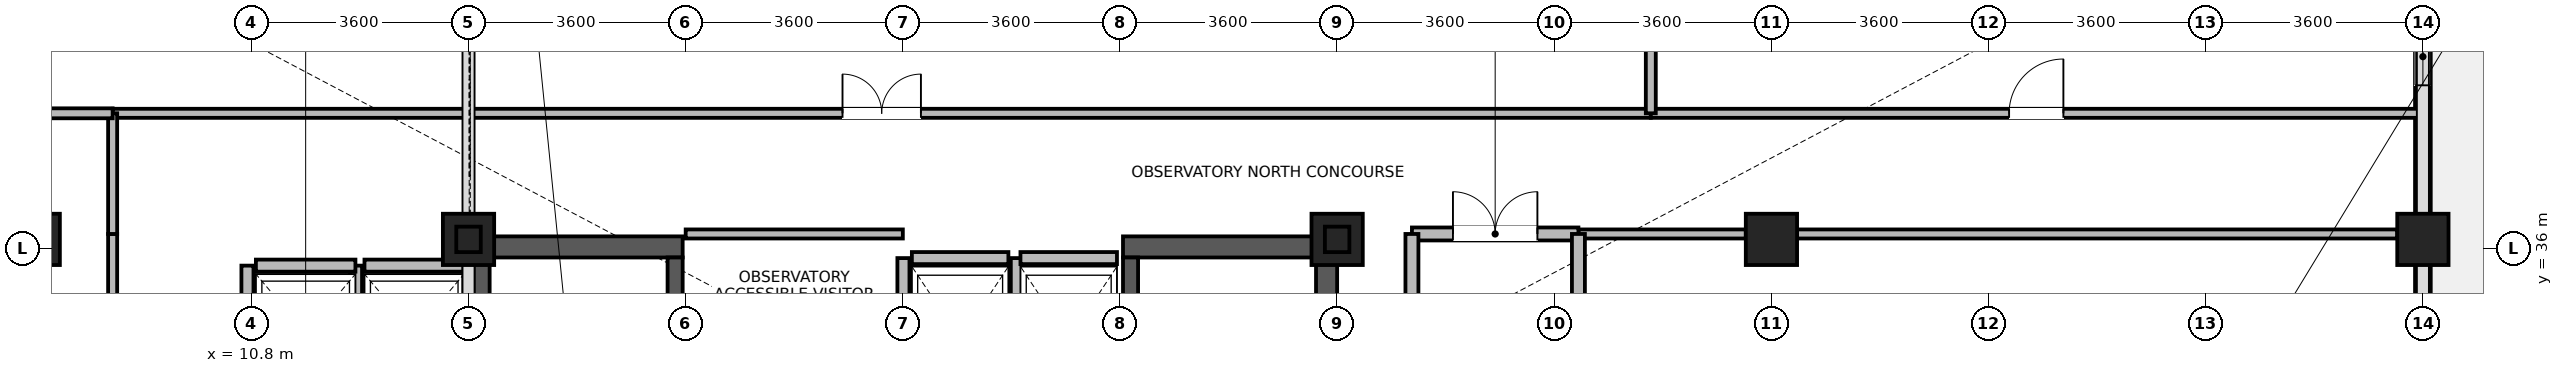
"""IFC4 building model, lengths in metres.
Left out: names, types, materials, properties, quantities, classifications, styles, units other than length and angle.
Written with IfcOpenShell. Run it as: python <this file> out.ifc"""

import sys

from ifc_helpers import new_model, si_unit, direction, frame, frame_2d, origin, origin_2d, place, context, subcontext, project, spatial, rectangle, i_section, extrude, source, transform, mapped, element, fill, save


model = new_model("IFC4")
c1 = context("Model", 3, precision=1e-05, world=origin(), true_north=direction((0.0, 1.0)))
c2 = subcontext(c1, "Body", "Model", "MODEL_VIEW")
j1 = project(units=[si_unit("LENGTHUNIT", "METRE"), si_unit("PLANEANGLEUNIT", "RADIAN")], contexts=[c1])
p1 = place(None, origin())
s1 = spatial("IfcSite", under=j1, at=p1, CompositionType="ELEMENT")
p2 = place(p1, origin())
s2 = spatial("IfcBuilding", under=s1, at=p2, CompositionType="ELEMENT")
p3 = place(p2, frame((0.0, 0.0, 298.0)))
s3 = spatial("IfcBuildingStorey", under=s2, at=p3, CompositionType="ELEMENT", Elevation=298.0)
for number, where, z_axis, x_axis in (
    (1, (14.575, 28.5, 0.0), (0.0, 0.0, 1.0), (0.0, 1.0, 0.0)),
    (2, (28.625, 28.5, 0.0), (0.0, 0.0, 1.0), (0.0, 1.0, 0.0)),
):
    element("IfcWall", number, at=place(p3, frame(where, z_axis=z_axis, x_axis=x_axis)), inside=s3, PredefinedType="SHEAR", context=c2, shape_type="SweptSolid", body=[
        extrude(rectangle(XDim=7.7, YDim=0.35, at=frame_2d((3.85, 0.0))), origin(), (0.0, 0.0, 1.0), 6.0),
    ])
for number, where, z_axis, x_axis in (
    (3, (14.75, 36.025, 0.0), (0.0, 0.0, 1.0), (1.0, 0.0, 0.0)),
    (4, (25.25, 36.025, 0.0), (0.0, 0.0, 1.0), (1.0, 0.0, 0.0)),
):
    element("IfcWall", number, at=place(p3, frame(where, z_axis=z_axis, x_axis=x_axis)), inside=s3, PredefinedType="SHEAR", context=c2, shape_type="SweptSolid", body=[
        extrude(rectangle(XDim=3.2, YDim=0.35, at=frame_2d((1.6, 0.0))), origin(), (0.0, 0.0, 1.0), 6.0),
    ])
p4 = place(p3, frame((17.825, 28.85, 0.0), z_axis=(0.0, 0.0, 1.0), x_axis=(0.0, 1.0, 0.0)))
e5 = element("IfcWall", 5, at=p4, inside=s3, PredefinedType="SHEAR", context=c2, shape_type="SweptSolid", body=[
    extrude(rectangle(XDim=7.0, YDim=0.25, at=frame_2d((3.5, 0.0))), origin(), (0.0, 0.0, 1.0), 6.0),
])
p5 = place(p4, frame((0.15, 0.0, 0.0)))
e6 = element("IfcOpeningElement", 6, at=p5, cuts=e5, PredefinedType="OPENING", context=c2, shape_type="SweptSolid", body=[
    extrude(rectangle(XDim=1.1, YDim=2.08, at=frame_2d((0.55, 1.04))), frame((0.0, 0.135, 0.0), z_axis=(0.0, -1.0, 0.0), x_axis=(1.0, 0.0, 0.0)), (0.0, 0.0, 1.0), 0.27),
])
p6 = place(p3, frame((25.375, 28.85, 0.0), z_axis=(0.0, 0.0, 1.0), x_axis=(0.0, 1.0, 0.0)))
e7 = element("IfcWall", 7, at=p6, inside=s3, PredefinedType="SHEAR", context=c2, shape_type="SweptSolid", body=[
    extrude(rectangle(XDim=7.0, YDim=0.25, at=frame_2d((3.5, 0.0))), origin(), (0.0, 0.0, 1.0), 6.0),
])
p7 = place(p6, frame((0.15, 0.0, 0.0)))
e8 = element("IfcOpeningElement", 8, at=p7, cuts=e7, PredefinedType="OPENING", context=c2, shape_type="SweptSolid", body=[
    extrude(rectangle(XDim=1.1, YDim=2.08, at=frame_2d((0.55, 1.04))), frame((0.0, 0.135, 0.0), z_axis=(0.0, -1.0, 0.0), x_axis=(1.0, 0.0, 0.0)), (0.0, 0.0, 1.0), 0.27),
])
m1 = source(origin(), c2, "Body", "SweptSolid", [
    extrude(rectangle(XDim=0.85, YDim=0.85, at=origin_2d()), origin(), (0.0, 0.0, 1.0), 6.0),
])
for number, where, z_axis, x_axis in (
    (9, (7.2, 36.15, 0.0), (0.0, 0.0, 1.0), (1.0, 0.0, 0.0)),
    (10, (14.4, 36.15, 0.0), (0.0, 0.0, 1.0), (1.0, 0.0, 0.0)),
    (11, (28.8, 36.15, 0.0), (0.0, 0.0, 1.0), (1.0, 0.0, 0.0)),
    (12, (36.0, 36.15, 0.0), (0.0, 0.0, 1.0), (1.0, 0.0, 0.0)),
    (13, (46.8, 36.15, 0.0), (0.0, 0.0, 1.0), (1.0, 0.0, 0.0)),
):
    element("IfcColumn", number, at=place(p3, frame(where, z_axis=z_axis, x_axis=x_axis)), inside=s3, PredefinedType="COLUMN", context=c2, shape_type="MappedRepresentation", body=[
        mapped(m1, transform((0.0, 0.0, 0.0), x_axis=(1.0, 0.0, 0.0), y_axis=(0.0, 1.0, 0.0), z_axis=(0.0, 0.0, 1.0), scale=1.0)),
    ])
m2 = source(origin(), c2, "Body", "SweptSolid", [
    extrude(i_section(OverallWidth=0.406, OverallDepth=0.422, WebThickness=0.023, FlangeThickness=0.031, FilletRadius=0.015, at=origin_2d()), origin(), (0.0, 0.0, 1.0), 29.81),
])
p8 = place(p3, frame((28.8, 36.15, 6.0), z_axis=(0.0, 0.0, 1.0), x_axis=(1.0, 0.0, 0.0)))
e14 = element("IfcColumn", 14, at=p8, inside=s3, PredefinedType="COLUMN", context=c2, shape_type="MappedRepresentation", body=[
    mapped(m2, transform((0.0, 0.0, 0.0), x_axis=(1.0, 0.0, 0.0), y_axis=(0.0, 1.0, 0.0), z_axis=(0.0, 0.0, 1.0), scale=1.0)),
])
m3 = source(origin(), c2, "Body", "SweptSolid", [
    extrude(i_section(OverallWidth=0.406, OverallDepth=0.422, WebThickness=0.023, FlangeThickness=0.031, FilletRadius=0.015, at=origin_2d()), origin(), (0.0, 0.0, 1.0), 28.41),
])
p9 = place(p3, frame((14.4, 36.15, 6.0), z_axis=(0.0, 0.0, 1.0), x_axis=(1.0, 0.0, 0.0)))
e15 = element("IfcColumn", 15, at=p9, inside=s3, PredefinedType="COLUMN", context=c2, shape_type="MappedRepresentation", body=[
    mapped(m3, transform((0.0, 0.0, 0.0), x_axis=(1.0, 0.0, 0.0), y_axis=(0.0, 1.0, 0.0), z_axis=(0.0, 0.0, 1.0), scale=1.0)),
])
p10 = place(p3, frame((46.8, 35.724, 0.0), z_axis=(0.0, 0.0, 1.0), x_axis=(0.0, -1.0, 0.0)))
e16 = element("IfcWall", 16, at=p10, inside=s3, PredefinedType="STANDARD", context=c2, shape_type="SweptSolid", body=[
    extrude(rectangle(XDim=6.648, YDim=0.26, at=frame_2d((3.324, 0.0))), origin(), (0.0, 0.0, 1.0), 5.58),
])
p11 = place(p10, frame((0.762, 0.0, 0.85)))
e17 = element("IfcOpeningElement", 17, at=p11, cuts=e16, PredefinedType="OPENING", context=c2, shape_type="SweptSolid", body=[
    extrude(rectangle(XDim=1.8, YDim=1.85, at=frame_2d((0.9, 0.925))), frame((0.0, 0.14, 0.0), z_axis=(0.0, -1.0, 0.0), x_axis=(1.0, 0.0, 0.0)), (0.0, 0.0, 1.0), 0.28),
])
p12 = place(p10, frame((4.086, 0.0, 0.85)))
e18 = element("IfcOpeningElement", 18, at=p12, cuts=e16, PredefinedType="OPENING", context=c2, shape_type="SweptSolid", body=[
    extrude(rectangle(XDim=1.8, YDim=1.85, at=frame_2d((0.9, 0.925))), frame((0.0, 0.14, 0.0), z_axis=(0.0, -1.0, 0.0), x_axis=(1.0, 0.0, 0.0)), (0.0, 0.0, 1.0), 0.28),
])
p13 = place(p3, frame((46.8, 42.774, 0.0), z_axis=(0.0, 0.0, 1.0), x_axis=(0.0, -1.0, 0.0)))
e19 = element("IfcWall", 19, at=p13, inside=s3, PredefinedType="STANDARD", context=c2, shape_type="SweptSolid", body=[
    extrude(rectangle(XDim=6.198, YDim=0.26, at=frame_2d((3.099, 0.0))), origin(), (0.0, 0.0, 1.0), 5.58),
])
p14 = place(p13, frame((0.649, 0.0, 0.85)))
e20 = element("IfcOpeningElement", 20, at=p14, cuts=e19, PredefinedType="OPENING", context=c2, shape_type="SweptSolid", body=[
    extrude(rectangle(XDim=1.8, YDim=1.85, at=frame_2d((0.9, 0.925))), frame((0.0, 0.14, 0.0), z_axis=(0.0, -1.0, 0.0), x_axis=(1.0, 0.0, 0.0)), (0.0, 0.0, 1.0), 0.28),
])
p15 = place(p13, frame((3.12, 0.0, 0.85)))
e21 = element("IfcOpeningElement", 21, at=p15, cuts=e19, PredefinedType="OPENING", context=c2, shape_type="SweptSolid", body=[
    extrude(rectangle(XDim=0.95, YDim=1.75, at=frame_2d((0.475, 0.875))), frame((0.0, 0.14, 0.0), z_axis=(0.0, -1.0, 0.0), x_axis=(1.0, 0.0, 0.0)), (0.0, 0.0, 1.0), 0.28),
])
p16 = place(p3, frame((12.675, 35.715, 0.0), z_axis=(0.0, 0.0, 1.0), x_axis=(1.0, 0.0, 0.0)))
e22 = element("IfcWall", 22, at=p16, inside=s3, PredefinedType="PARTITIONING", context=c2, shape_type="SweptSolid", body=[
    extrude(rectangle(XDim=1.65, YDim=0.2, at=frame_2d((0.825, 0.0))), origin(), (0.0, 0.0, 1.0), 5.9),
])
p17 = place(p3, frame((12.535, 33.485, 0.0), z_axis=(0.0, 0.0, 1.0), x_axis=(0.0, 1.0, 0.0)))
e23 = element("IfcWall", 23, at=p17, inside=s3, PredefinedType="PARTITIONING", context=c2, shape_type="SweptSolid", body=[
    extrude(rectangle(XDim=2.23, YDim=0.2, at=frame_2d((1.115, 0.0))), origin(), (0.0, 0.0, 1.0), 5.9),
])
p18 = place(p3, frame((10.875, 35.715, 0.0), z_axis=(0.0, 0.0, 1.0), x_axis=(1.0, 0.0, 0.0)))
e24 = element("IfcWall", 24, at=p18, inside=s3, PredefinedType="PARTITIONING", context=c2, shape_type="SweptSolid", body=[
    extrude(rectangle(XDim=1.65, YDim=0.2, at=frame_2d((0.825, 0.0))), origin(), (0.0, 0.0, 1.0), 5.9),
])
p19 = place(p3, frame((10.735, 33.485, 0.0), z_axis=(0.0, 0.0, 1.0), x_axis=(0.0, 1.0, 0.0)))
e25 = element("IfcWall", 25, at=p19, inside=s3, PredefinedType="PARTITIONING", context=c2, shape_type="SweptSolid", body=[
    extrude(rectangle(XDim=2.23, YDim=0.2, at=frame_2d((1.115, 0.0))), origin(), (0.0, 0.0, 1.0), 5.9),
])
p20 = place(p3, frame((21.75, 35.84, 0.0), z_axis=(0.0, 0.0, 1.0), x_axis=(1.0, 0.0, 0.0)))
e26 = element("IfcWall", 26, at=p20, inside=s3, PredefinedType="PARTITIONING", context=c2, shape_type="SweptSolid", body=[
    extrude(rectangle(XDim=1.6, YDim=0.2, at=frame_2d((0.8, 0.0))), origin(), (0.0, 0.0, 1.0), 5.08),
])
for number, where, z_axis, x_axis in (
    (27, (21.61, 33.16, 0.0), (0.0, 0.0, 1.0), (0.0, 1.0, 0.0)),
    (28, (23.49, 33.16, 0.0), (0.0, 0.0, 1.0), (0.0, 1.0, 0.0)),
):
    element("IfcWall", number, at=place(p3, frame(where, z_axis=z_axis, x_axis=x_axis)), inside=s3, PredefinedType="PARTITIONING", context=c2, shape_type="SweptSolid", body=[
        extrude(rectangle(XDim=2.68, YDim=0.2, at=frame_2d((1.34, 0.0))), origin(), (0.0, 0.0, 1.0), 5.9),
    ])
p21 = place(p3, frame((23.55, 35.84, 0.0), z_axis=(0.0, 0.0, 1.0), x_axis=(1.0, 0.0, 0.0)))
e29 = element("IfcWall", 29, at=p21, inside=s3, PredefinedType="PARTITIONING", context=c2, shape_type="SweptSolid", body=[
    extrude(rectangle(XDim=1.6, YDim=0.2, at=frame_2d((0.8, 0.0))), origin(), (0.0, 0.0, 1.0), 5.08),
])
p22 = place(p3, frame((8.5, 38.24, 0.0), z_axis=(0.0, 0.0, 1.0), x_axis=(1.0, 0.0, 0.0)))
e30 = element("IfcWall", 30, at=p22, inside=s3, PredefinedType="PARTITIONING", context=c2, shape_type="SweptSolid", body=[
    extrude(rectangle(XDim=25.5, YDim=0.15, at=frame_2d((12.75, 0.0))), origin(), (0.0, 0.0, 1.0), 5.9),
])
p23 = place(p22, frame((12.1, 0.0, 0.0)))
e31 = element("IfcOpeningElement", 31, at=p23, cuts=e30, PredefinedType="OPENING", context=c2, shape_type="SweptSolid", body=[
    extrude(rectangle(XDim=1.3, YDim=2.12, at=frame_2d((0.65, 1.06))), frame((0.0, 0.085, 0.0), z_axis=(0.0, -1.0, 0.0), x_axis=(1.0, 0.0, 0.0)), (0.0, 0.0, 1.0), 0.17),
])
p24 = place(p3, frame((32.8, 36.24, 0.0), z_axis=(0.0, 0.0, 1.0), x_axis=(1.0, 0.0, 0.0)))
e32 = element("IfcWall", 32, at=p24, inside=s3, PredefinedType="PARTITIONING", context=c2, shape_type="SweptSolid", body=[
    extrude(rectangle(XDim=2.775, YDim=0.15, at=frame_2d((1.387, 0.0))), origin(), (0.0, 0.0, 1.0), 5.43),
])
p25 = place(p3, frame((36.425, 36.24, 0.0), z_axis=(0.0, 0.0, 1.0), x_axis=(1.0, 0.0, 0.0)))
e33 = element("IfcWall", 33, at=p25, inside=s3, PredefinedType="PARTITIONING", context=c2, shape_type="SweptSolid", body=[
    extrude(rectangle(XDim=9.95, YDim=0.15, at=frame_2d((4.975, 0.0))), origin(), (0.0, 0.0, 1.0), 5.43),
])
p26 = place(p3, frame((34.0, 38.24, 0.0), z_axis=(0.0, 0.0, 1.0), x_axis=(1.0, 0.0, 0.0)))
e34 = element("IfcWall", 34, at=p26, inside=s3, PredefinedType="PARTITIONING", context=c2, shape_type="SweptSolid", body=[
    extrude(rectangle(XDim=12.78, YDim=0.15, at=frame_2d((6.39, 0.0))), origin(), (0.0, 0.0, 1.0), 5.9),
])
p27 = place(p26, frame((5.94, 0.0, 0.0)))
e35 = element("IfcOpeningElement", 35, at=p27, cuts=e34, PredefinedType="OPENING", context=c2, shape_type="SweptSolid", body=[
    extrude(rectangle(XDim=0.9, YDim=2.08, at=frame_2d((0.45, 1.04))), frame((0.0, 0.085, 0.0), z_axis=(0.0, -1.0, 0.0), x_axis=(1.0, 0.0, 0.0)), (0.0, 0.0, 1.0), 0.17),
])
p28 = place(p3, frame((8.5, 28.56, 0.0), z_axis=(0.0, 0.0, 1.0), x_axis=(0.0, 1.0, 0.0)))
e36 = element("IfcWall", 36, at=p28, inside=s3, PredefinedType="PARTITIONING", context=c2, shape_type="SweptSolid", body=[
    extrude(rectangle(XDim=7.68, YDim=0.15, at=frame_2d((3.84, 0.0))), origin(), (0.0, 0.0, 1.0), 5.9),
])
p29 = place(p28, frame((3.19, 0.0, 0.0)))
e37 = element("IfcOpeningElement", 37, at=p29, cuts=e36, PredefinedType="OPENING", context=c2, shape_type="SweptSolid", body=[
    extrude(rectangle(XDim=1.3, YDim=2.12, at=frame_2d((0.65, 1.06))), frame((0.0, 0.085, 0.0), z_axis=(0.0, -1.0, 0.0), x_axis=(1.0, 0.0, 0.0)), (0.0, 0.0, 1.0), 0.17),
])
p30 = place(p3, frame((18.0, 36.24, 0.0), z_axis=(0.0, 0.0, 1.0), x_axis=(1.0, 0.0, 0.0)))
e38 = element("IfcWall", 38, at=p30, inside=s3, PredefinedType="PARTITIONING", context=c2, shape_type="SweptSolid", body=[
    extrude(rectangle(XDim=3.6, YDim=0.15, at=frame_2d((1.8, 0.0))), origin(), (0.0, 0.0, 1.0), 5.08),
])
p31 = place(p3, frame((30.04, 36.24, 0.0), z_axis=(0.0, 0.0, 1.0), x_axis=(1.0, 0.0, 0.0)))
e39 = element("IfcWall", 39, at=p31, inside=s3, PredefinedType="PARTITIONING", context=c2, shape_type="SweptSolid", body=[
    extrude(rectangle(XDim=2.76, YDim=0.215, at=frame_2d((1.38, 0.0))), origin(), (0.0, 0.0, 1.0), 5.43),
])
p32 = place(p31, frame((0.68, 0.0, 0.0)))
e40 = element("IfcOpeningElement", 40, at=p32, cuts=e39, PredefinedType="OPENING", context=c2, shape_type="SweptSolid", body=[
    extrude(rectangle(XDim=1.4, YDim=2.15, at=frame_2d((0.7, 1.075))), frame((0.0, 0.118, 0.0), z_axis=(0.0, -1.0, 0.0), x_axis=(1.0, 0.0, 0.0)), (0.0, 0.0, 1.0), 0.235),
])
p33 = place(p3, frame((8.5, 36.24, 0.0), z_axis=(0.0, 0.0, 1.0), x_axis=(0.0, 1.0, 0.0)))
e41 = element("IfcWall", 41, at=p33, inside=s3, PredefinedType="PARTITIONING", context=c2, shape_type="SweptSolid", body=[
    extrude(rectangle(XDim=2.0, YDim=0.15, at=frame_2d((1.0, 0.0))), origin(), (0.0, 0.0, 1.0), 5.9),
])
p34 = place(p3, frame((34.0, 38.24, 0.0), z_axis=(0.0, 0.0, 1.0), x_axis=(0.0, 1.0, 0.0)))
e42 = element("IfcWall", 42, at=p34, inside=s3, PredefinedType="PARTITIONING", context=c2, shape_type="SweptSolid", body=[
    extrude(rectangle(XDim=4.94, YDim=0.165, at=frame_2d((2.47, 0.0))), origin(), (0.0, 0.0, 1.0), 5.9),
])
p35 = place(p3, frame((3.732, 38.24, 0.0), z_axis=(0.0, 0.0, 1.0), x_axis=(1.0, 0.0, 0.0)))
e43 = element("IfcWall", 43, at=p35, inside=s3, PredefinedType="PARTITIONING", context=c2, shape_type="SweptSolid", body=[
    extrude(rectangle(XDim=4.768, YDim=0.165, at=frame_2d((2.384, 0.0))), origin(), (0.0, 0.0, 1.0), 5.9),
])
for number, where, z_axis, x_axis in (
    (44, (30.04, 31.8, 0.0), (0.0, 0.0, 1.0), (0.0, 1.0, 0.0)),
    (45, (32.8, 31.8, 0.0), (0.0, 0.0, 1.0), (0.0, 1.0, 0.0)),
):
    element("IfcWall", number, at=place(p3, frame(where, z_axis=z_axis, x_axis=x_axis)), inside=s3, PredefinedType="PARTITIONING", context=c2, shape_type="SweptSolid", body=[
        extrude(rectangle(XDim=4.44, YDim=0.215, at=frame_2d((2.22, 0.0))), origin(), (0.0, 0.0, 1.0), 5.9),
    ])
p36 = place(p15, origin())
e46 = element("IfcWindow", 46, at=p36, inside=s3, PartitioningType="SINGLE_PANEL", PredefinedType="WINDOW", context=c2, shape_type="SweptSolid", body=[
    extrude(rectangle(XDim=0.95, YDim=1.75, at=frame_2d((0.475, 0.875))), frame((0.0, 0.03, 0.0), z_axis=(0.0, -1.0, 0.0), x_axis=(1.0, 0.0, 0.0)), (0.0, 0.0, 1.0), 0.06),
])
fill(e21, e46)
p37 = place(p23, origin())
e47 = element("IfcDoor", 47, at=p37, inside=s3, OperationType="DOUBLE_DOOR_SINGLE_SWING", PredefinedType="DOOR", context=c2, shape_type="SweptSolid", body=[
    extrude(rectangle(XDim=1.3, YDim=2.12, at=frame_2d((0.65, 1.06))), frame((0.0, 0.025, 0.0), z_axis=(0.0, -1.0, 0.0), x_axis=(1.0, 0.0, 0.0)), (0.0, 0.0, 1.0), 0.05),
])
fill(e31, e47)
p38 = place(p27, origin())
e48 = element("IfcDoor", 48, at=p38, inside=s3, OperationType="SINGLE_SWING_RIGHT", PredefinedType="DOOR", context=c2, shape_type="SweptSolid", body=[
    extrude(rectangle(XDim=0.9, YDim=2.08, at=frame_2d((0.45, 1.04))), frame((0.0, 0.025, 0.0), z_axis=(0.0, -1.0, 0.0), x_axis=(1.0, 0.0, 0.0)), (0.0, 0.0, 1.0), 0.05),
])
fill(e35, e48)
p39 = place(p32, origin())
e49 = element("IfcDoor", 49, at=p39, inside=s3, OperationType="DOUBLE_DOOR_SINGLE_SWING", PredefinedType="DOOR", context=c2, shape_type="SweptSolid", body=[
    extrude(rectangle(XDim=1.4, YDim=2.15, at=frame_2d((0.7, 1.075))), frame((0.0, 0.025, 0.0), z_axis=(0.0, -1.0, 0.0), x_axis=(1.0, 0.0, 0.0)), (0.0, 0.0, 1.0), 0.05),
])
fill(e40, e49)
save(model, sys.argv[1])
